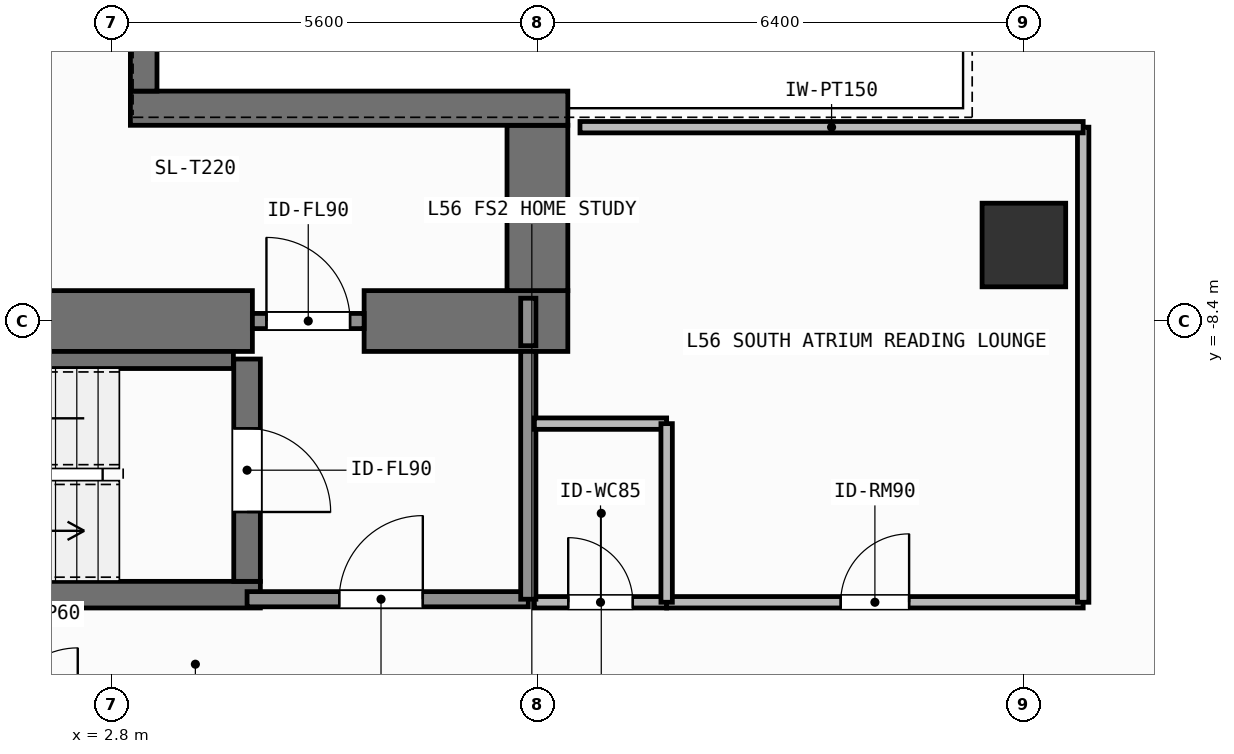
"""IFC4 building model, lengths in metres.
Left out: names, types, materials, properties, quantities, classifications, styles, units other than length and angle.
Written with IfcOpenShell. Run it as: python <this file> out.ifc"""

import sys

from ifc_helpers import new_model, si_unit, direction, frame, frame_2d, origin, origin_2d, place, context, subcontext, project, spatial, rectangle, extrude, element, fill, save


model = new_model("IFC4")
c1 = context("Model", 3, precision=1e-05, world=origin(), true_north=direction((0.0, 1.0)))
c2 = subcontext(c1, "Body", "Model", "MODEL_VIEW")
j1 = project(units=[si_unit("LENGTHUNIT", "METRE"), si_unit("PLANEANGLEUNIT", "RADIAN")], contexts=[c1])
p1 = place(None, origin())
s1 = spatial("IfcSite", under=j1, at=p1, CompositionType="ELEMENT")
p2 = place(p1, origin())
s2 = spatial("IfcBuilding", under=s1, at=p2, CompositionType="ELEMENT")
p3 = place(p2, frame((0.0, 0.0, 227.4)))
s3 = spatial("IfcBuildingStorey", under=s2, at=p3, CompositionType="ELEMENT", Elevation=227.4)
p4 = place(p3, frame((-2.62, -8.4, 0.0), z_axis=(0.0, 0.0, 1.0), x_axis=(1.0, 0.0, 0.0)))
e1 = element("IfcWall", 1, at=p4, inside=s3, PredefinedType="SHEAR", context=c2, shape_type="SweptSolid", body=[
    extrude(rectangle(XDim=7.27, YDim=0.8, at=frame_2d((3.635, 0.0))), origin(), (0.0, 0.0, 1.0), 3.9),
])
p5 = place(p3, frame((6.12, -8.4, 0.0), z_axis=(0.0, 0.0, 1.0), x_axis=(1.0, 0.0, 0.0)))
e2 = element("IfcWall", 2, at=p5, inside=s3, PredefinedType="SHEAR", context=c2, shape_type="SweptSolid", body=[
    extrude(rectangle(XDim=2.68, YDim=0.8, at=frame_2d((1.34, 0.0))), origin(), (0.0, 0.0, 1.0), 3.9),
])
p6 = place(p3, frame((8.4, -8.0, 0.0), z_axis=(0.0, 0.0, 1.0), x_axis=(0.0, 1.0, 0.0)))
e3 = element("IfcWall", 3, at=p6, inside=s3, PredefinedType="SHEAR", context=c2, shape_type="SweptSolid", body=[
    extrude(rectangle(XDim=2.175, YDim=0.8, at=frame_2d((1.087, 0.0))), origin(), (0.0, 0.0, 1.0), 3.9),
])
p7 = place(p3, frame((3.045, -5.6, 0.0), z_axis=(0.0, 0.0, 1.0), x_axis=(1.0, 0.0, 0.0)))
e4 = element("IfcWall", 4, at=p7, inside=s3, PredefinedType="SHEAR", context=c2, shape_type="SweptSolid", body=[
    extrude(rectangle(XDim=5.755, YDim=0.45, at=frame_2d((2.877, 0.0))), origin(), (0.0, 0.0, 1.0), 3.9),
])
p8 = place(p3, frame((3.22, -5.375, 0.0), z_axis=(0.0, 0.0, 1.0), x_axis=(0.0, 1.0, 0.0)))
e5 = element("IfcWall", 5, at=p8, inside=s3, PredefinedType="SHEAR", context=c2, shape_type="SweptSolid", body=[
    extrude(rectangle(XDim=10.75, YDim=0.35, at=frame_2d((5.375, 0.0))), origin(), (0.0, 0.0, 1.0), 3.9),
])
p9 = place(p3, frame((-2.555, -12.0, 0.0), z_axis=(0.0, 0.0, 1.0), x_axis=(1.0, 0.0, 0.0)))
e6 = element("IfcWall", 6, at=p9, inside=s3, PredefinedType="SHEAR", context=c2, shape_type="SweptSolid", body=[
    extrude(rectangle(XDim=7.31, YDim=0.35, at=frame_2d((3.655, 0.0))), origin(), (0.0, 0.0, 1.0), 3.9),
])
p10 = place(p3, frame((-2.2, -8.913, 0.0), z_axis=(0.0, 0.0, 1.0), x_axis=(1.0, 0.0, 0.0)))
e7 = element("IfcWall", 7, at=p10, inside=s3, PredefinedType="SHEAR", context=c2, shape_type="SweptSolid", body=[
    extrude(rectangle(XDim=6.6, YDim=0.225, at=frame_2d((3.3, 0.0))), origin(), (0.0, 0.0, 1.0), 3.9),
])
p11 = place(p3, frame((4.58, -8.9, 0.0), z_axis=(0.0, 0.0, 1.0), x_axis=(0.0, -1.0, 0.0)))
e8 = element("IfcWall", 8, at=p11, inside=s3, PredefinedType="SHEAR", context=c2, shape_type="SweptSolid", body=[
    extrude(rectangle(XDim=2.925, YDim=0.35, at=frame_2d((1.462, 0.0))), origin(), (0.0, 0.0, 1.0), 3.9),
])
p12 = place(p11, frame((0.913, 0.0, 0.0)))
e9 = element("IfcOpeningElement", 9, at=p12, cuts=e8, PredefinedType="OPENING", context=c2, shape_type="SweptSolid", body=[
    extrude(rectangle(XDim=1.1, YDim=2.15, at=frame_2d((0.55, 1.075))), frame((0.0, 0.185, 0.0), z_axis=(0.0, -1.0, 0.0), x_axis=(1.0, 0.0, 0.0)), (0.0, 0.0, 1.0), 0.37),
])
p13 = place(p3, frame((14.8, -7.4, 0.0), z_axis=(0.0, 0.0, 1.0), x_axis=(1.0, 0.0, 0.0)))
e10 = element("IfcColumn", 10, at=p13, inside=s3, PredefinedType="COLUMN", context=c2, shape_type="SweptSolid", body=[
    extrude(rectangle(XDim=1.1, YDim=1.1, at=origin_2d()), origin(), (0.0, 0.0, 1.0), 3.9),
])
p14 = place(p3, frame((4.58, -12.06, 0.0), z_axis=(0.0, 0.0, 1.0), x_axis=(1.0, 0.0, 0.0)))
e11 = element("IfcWall", 11, at=p14, inside=s3, PredefinedType="SOLIDWALL", context=c2, shape_type="SweptSolid", body=[
    extrude(rectangle(XDim=3.7, YDim=0.2, at=frame_2d((1.85, 0.0))), origin(), (0.0, 0.0, 1.0), 3.68),
])
p15 = place(p14, frame((1.212, 0.0, 0.0)))
e12 = element("IfcOpeningElement", 12, at=p15, cuts=e11, PredefinedType="OPENING", context=c2, shape_type="SweptSolid", body=[
    extrude(rectangle(XDim=1.1, YDim=2.15, at=frame_2d((0.55, 1.075))), frame((0.0, 0.11, 0.0), z_axis=(0.0, -1.0, 0.0), x_axis=(1.0, 0.0, 0.0)), (0.0, 0.0, 1.0), 0.22),
])
p16 = place(p3, frame((4.65, -8.4, 0.0), z_axis=(0.0, 0.0, 1.0), x_axis=(1.0, 0.0, 0.0)))
e13 = element("IfcWall", 13, at=p16, inside=s3, PredefinedType="SOLIDWALL", context=c2, shape_type="SweptSolid", body=[
    extrude(rectangle(XDim=1.47, YDim=0.2, at=frame_2d((0.735, 0.0))), origin(), (0.0, 0.0, 1.0), 2.82),
])
p17 = place(p16, frame((0.185, 0.0, 0.0)))
e14 = element("IfcOpeningElement", 14, at=p17, cuts=e13, PredefinedType="OPENING", context=c2, shape_type="SweptSolid", body=[
    extrude(rectangle(XDim=1.1, YDim=2.15, at=frame_2d((0.55, 1.075))), frame((0.0, 0.11, 0.0), z_axis=(0.0, -1.0, 0.0), x_axis=(1.0, 0.0, 0.0)), (0.0, 0.0, 1.0), 0.22),
])
p18 = place(p3, frame((8.36, -12.1, 0.0), z_axis=(0.0, 0.0, 1.0), x_axis=(1.0, 0.0, 0.0)))
e15 = element("IfcWall", 15, at=p18, inside=s3, PredefinedType="PARTITIONING", context=c2, shape_type="SweptSolid", body=[
    extrude(rectangle(XDim=1.74, YDim=0.15, at=frame_2d((0.87, 0.0))), origin(), (0.0, 0.0, 1.0), 3.68),
])
p19 = place(p18, frame((0.445, 0.0, 0.0)))
e16 = element("IfcOpeningElement", 16, at=p19, cuts=e15, PredefinedType="OPENING", context=c2, shape_type="SweptSolid", body=[
    extrude(rectangle(XDim=0.85, YDim=2.1, at=frame_2d((0.425, 1.05))), frame((0.0, 0.085, 0.0), z_axis=(0.0, -1.0, 0.0), x_axis=(1.0, 0.0, 0.0)), (0.0, 0.0, 1.0), 0.17),
])
p20 = place(p3, frame((10.1, -12.1, 0.0), z_axis=(0.0, 0.0, 1.0), x_axis=(1.0, 0.0, 0.0)))
e17 = element("IfcWall", 17, at=p20, inside=s3, PredefinedType="PARTITIONING", context=c2, shape_type="SweptSolid", body=[
    extrude(rectangle(XDim=5.48, YDim=0.15, at=frame_2d((2.74, 0.0))), origin(), (0.0, 0.0, 1.0), 3.68),
])
p21 = place(p20, frame((2.29, 0.0, 0.0)))
e18 = element("IfcOpeningElement", 18, at=p21, cuts=e17, PredefinedType="OPENING", context=c2, shape_type="SweptSolid", body=[
    extrude(rectangle(XDim=0.9, YDim=2.1, at=frame_2d((0.45, 1.05))), frame((0.0, 0.085, 0.0), z_axis=(0.0, -1.0, 0.0), x_axis=(1.0, 0.0, 0.0)), (0.0, 0.0, 1.0), 0.17),
])
p22 = place(p3, frame((8.28, -12.06, 0.0), z_axis=(0.0, 0.0, 1.0), x_axis=(0.0, 1.0, 0.0)))
e19 = element("IfcWall", 19, at=p22, inside=s3, PredefinedType="SOLIDWALL", context=c2, shape_type="SweptSolid", body=[
    extrude(rectangle(XDim=3.26, YDim=0.2, at=frame_2d((1.63, 0.0))), origin(), (0.0, 0.0, 1.0), 3.68),
])
p23 = place(p3, frame((8.28, -8.725, 0.0), z_axis=(0.0, 0.0, 1.0), x_axis=(0.0, 1.0, 0.0)))
e20 = element("IfcWall", 20, at=p23, inside=s3, PredefinedType="SOLIDWALL", context=c2, shape_type="SweptSolid", body=[
    extrude(rectangle(XDim=0.625, YDim=0.2, at=frame_2d((0.312, 0.0))), origin(), (0.0, 0.0, 1.0), 3.68),
])
p24 = place(p3, frame((8.36, -9.75, 0.0), z_axis=(0.0, 0.0, 1.0), x_axis=(1.0, 0.0, 0.0)))
e21 = element("IfcWall", 21, at=p24, inside=s3, PredefinedType="PARTITIONING", context=c2, shape_type="SweptSolid", body=[
    extrude(rectangle(XDim=1.74, YDim=0.15, at=frame_2d((0.87, 0.0))), origin(), (0.0, 0.0, 1.0), 3.68),
])
p25 = place(p3, frame((10.1, -12.1, 0.0), z_axis=(0.0, 0.0, 1.0), x_axis=(0.0, 1.0, 0.0)))
e22 = element("IfcWall", 22, at=p25, inside=s3, PredefinedType="PARTITIONING", context=c2, shape_type="SweptSolid", body=[
    extrude(rectangle(XDim=2.35, YDim=0.15, at=frame_2d((1.175, 0.0))), origin(), (0.0, 0.0, 1.0), 3.68),
])
p26 = place(p3, frame((15.58, -12.1, 0.0), z_axis=(0.0, 0.0, 1.0), x_axis=(0.0, 1.0, 0.0)))
e23 = element("IfcWall", 23, at=p26, inside=s3, PredefinedType="PARTITIONING", context=c2, shape_type="SweptSolid", body=[
    extrude(rectangle(XDim=6.25, YDim=0.15, at=frame_2d((3.125, 0.0))), origin(), (0.0, 0.0, 1.0), 3.68),
])
p27 = place(p3, frame((8.96, -5.85, 0.0), z_axis=(0.0, 0.0, 1.0), x_axis=(1.0, 0.0, 0.0)))
e24 = element("IfcWall", 24, at=p27, inside=s3, PredefinedType="PARTITIONING", context=c2, shape_type="SweptSolid", body=[
    extrude(rectangle(XDim=6.62, YDim=0.15, at=frame_2d((3.31, 0.0))), origin(), (0.0, 0.0, 1.0), 3.68),
])
p28 = place(p12, origin())
e25 = element("IfcDoor", 25, at=p28, inside=s3, OperationType="SINGLE_SWING_RIGHT", PredefinedType="DOOR", context=c2, shape_type="SweptSolid", body=[
    extrude(rectangle(XDim=1.1, YDim=2.15, at=frame_2d((0.55, 1.075))), frame((0.0, 0.025, 0.0), z_axis=(0.0, -1.0, 0.0), x_axis=(1.0, 0.0, 0.0)), (0.0, 0.0, 1.0), 0.05),
])
fill(e9, e25)
p29 = place(p15, origin())
e26 = element("IfcDoor", 26, at=p29, inside=s3, OperationType="SINGLE_SWING_RIGHT", PredefinedType="DOOR", context=c2, shape_type="SweptSolid", body=[
    extrude(rectangle(XDim=1.1, YDim=2.15, at=frame_2d((0.55, 1.075))), frame((0.0, 0.025, 0.0), z_axis=(0.0, -1.0, 0.0), x_axis=(1.0, 0.0, 0.0)), (0.0, 0.0, 1.0), 0.05),
])
fill(e12, e26)
p30 = place(p17, origin())
e27 = element("IfcDoor", 27, at=p30, inside=s3, OperationType="SINGLE_SWING_LEFT", PredefinedType="DOOR", context=c2, shape_type="SweptSolid", body=[
    extrude(rectangle(XDim=1.1, YDim=2.15, at=frame_2d((0.55, 1.075))), frame((0.0, 0.025, 0.0), z_axis=(0.0, -1.0, 0.0), x_axis=(1.0, 0.0, 0.0)), (0.0, 0.0, 1.0), 0.05),
])
fill(e14, e27)
p31 = place(p19, origin())
e28 = element("IfcDoor", 28, at=p31, inside=s3, OperationType="SINGLE_SWING_LEFT", PredefinedType="DOOR", context=c2, shape_type="SweptSolid", body=[
    extrude(rectangle(XDim=0.85, YDim=2.1, at=frame_2d((0.425, 1.05))), frame((0.0, 0.025, 0.0), z_axis=(0.0, -1.0, 0.0), x_axis=(1.0, 0.0, 0.0)), (0.0, 0.0, 1.0), 0.05),
])
fill(e16, e28)
p32 = place(p21, origin())
e29 = element("IfcDoor", 29, at=p32, inside=s3, OperationType="SINGLE_SWING_RIGHT", PredefinedType="DOOR", context=c2, shape_type="SweptSolid", body=[
    extrude(rectangle(XDim=0.9, YDim=2.1, at=frame_2d((0.45, 1.05))), frame((0.0, 0.025, 0.0), z_axis=(0.0, -1.0, 0.0), x_axis=(1.0, 0.0, 0.0)), (0.0, 0.0, 1.0), 0.05),
])
fill(e18, e29)
save(model, sys.argv[1])
